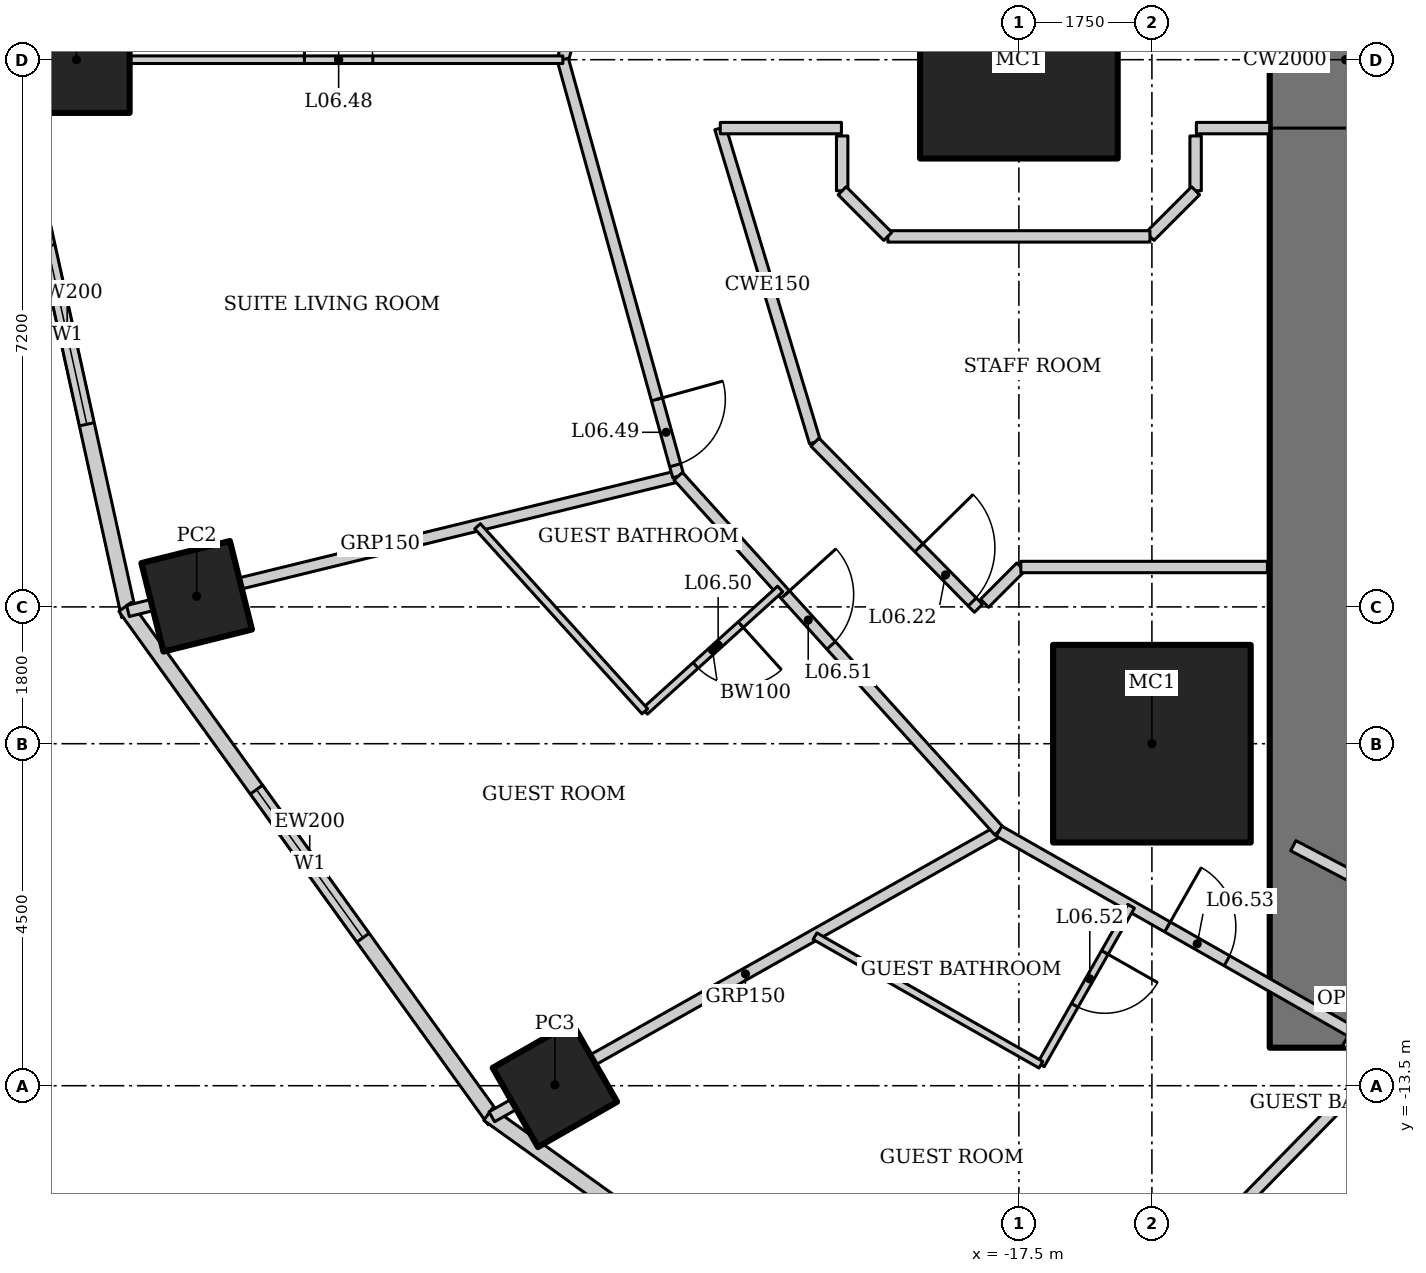
"""IFC4 building model, lengths in metres.
Left out: names, types, materials, properties, quantities, classifications, styles, units other than length and angle.
Written with IfcOpenShell. Run it as: python <this file> out.ifc"""

import sys

from ifc_helpers import new_model, si_unit, direction, frame, frame_2d, origin, origin_2d, place, context, subcontext, project, spatial, rectangle, hollow_rectangle, extrude, element, fill, save


model = new_model("IFC4")
c1 = context("Model", 3, precision=1e-05, world=origin(), true_north=direction((0.0, 1.0)))
c2 = subcontext(c1, "Body", "Model", "MODEL_VIEW")
j1 = project(units=[si_unit("LENGTHUNIT", "METRE"), si_unit("PLANEANGLEUNIT", "RADIAN")], contexts=[c1])
p1 = place(None, origin())
s1 = spatial("IfcSite", under=j1, at=p1, CompositionType="ELEMENT")
p2 = place(p1, origin())
s2 = spatial("IfcBuilding", under=s1, at=p2, CompositionType="ELEMENT")
p3 = place(p2, frame((0.0, 0.0, 37.0)))
s3 = spatial("IfcBuildingStorey", under=s2, at=p3, CompositionType="ELEMENT", Elevation=37.0)
for number, where, z_axis, x_axis in (
    (1, (-17.5, 0.0, 0.0), (0.0, 0.0, 1.0), (1.0, 0.0, 0.0)),
    (2, (-15.75, -9.0, 0.0), (0.0, 0.0, 1.0), (1.0, 0.0, 0.0)),
):
    element("IfcColumn", number, at=place(p3, frame(where, z_axis=z_axis, x_axis=x_axis)), inside=s3, PredefinedType="COLUMN", context=c2, shape_type="SweptSolid", body=[
        extrude(hollow_rectangle(XDim=2.6, YDim=2.6, WallThickness=0.13, at=origin_2d()), origin(), (0.0, 0.0, 1.0), 3.6),
    ])
p4 = place(p3, frame((-29.9, 0.0, 0.0), z_axis=(0.0, 0.0, 1.0), x_axis=(1.0, 0.0, 0.0)))
e3 = element("IfcColumn", 3, at=p4, inside=s3, PredefinedType="COLUMN", context=c2, shape_type="SweptSolid", body=[
    extrude(hollow_rectangle(XDim=1.4, YDim=1.4, WallThickness=0.1, at=origin_2d()), origin(), (0.0, 0.0, 1.0), 3.6),
])
p5 = place(p3, frame((-28.318, -7.06, 0.0), z_axis=(0.0, 0.0, 1.0), x_axis=(0.970295726276, 0.2419218956, 0.0)))
e4 = element("IfcColumn", 4, at=p5, inside=s3, PredefinedType="COLUMN", context=c2, shape_type="SweptSolid", body=[
    extrude(hollow_rectangle(XDim=1.2, YDim=1.2, WallThickness=0.1, at=origin_2d()), origin(), (0.0, 0.0, 1.0), 3.6),
])
p6 = place(p3, frame((-23.605, -13.489, 0.0), z_axis=(0.0, 0.0, 1.0), x_axis=(0.86824298017, 0.496139221777, 0.0)))
e5 = element("IfcColumn", 5, at=p6, inside=s3, PredefinedType="COLUMN", context=c2, shape_type="SweptSolid", body=[
    extrude(hollow_rectangle(XDim=1.2, YDim=1.2, WallThickness=0.12, at=origin_2d()), origin(), (0.0, 0.0, 1.0), 3.6),
])
p7 = place(p3, frame((-13.2, 13.0, 0.0), z_axis=(0.0, 0.0, 1.0), x_axis=(0.0, -1.0, 0.0)))
e6 = element("IfcWall", 6, at=p7, inside=s3, PredefinedType="SHEAR", context=c2, shape_type="SweptSolid", body=[
    extrude(rectangle(XDim=26.0, YDim=2.0, at=frame_2d((13.0, 0.0))), origin(), (0.0, 0.0, 1.0), 3.6),
])
p8 = place(p7, frame((12.1, 0.0, 0.0)))
e7 = element("IfcOpeningElement", 7, at=p8, cuts=e6, PredefinedType="OPENING", context=c2, shape_type="SweptSolid", body=[
    extrude(rectangle(XDim=1.8, YDim=2.1, at=frame_2d((0.9, 1.05))), frame((0.0, 1.01, 0.0), z_axis=(0.0, -1.0, 0.0), x_axis=(1.0, 0.0, 0.0)), (0.0, 0.0, 1.0), 2.02),
])
p9 = place(p3, frame((-29.208, 7.318, 0.0), z_axis=(0.0, 0.0, 1.0), x_axis=(-0.215238065514, -0.976561608478, 0.0)))
e8 = element("IfcWall", 8, at=p9, inside=s3, PredefinedType="SOLIDWALL", context=c2, shape_type="SweptSolid", body=[
    extrude(rectangle(XDim=7.562, YDim=0.2, at=frame_2d((3.781, 0.0))), origin(), (0.0, 0.0, 1.0), 3.45),
])
p10 = place(p9, frame((2.581, 0.0, 0.5)))
e9 = element("IfcOpeningElement", 9, at=p10, cuts=e8, PredefinedType="OPENING", context=c2, shape_type="SweptSolid", body=[
    extrude(rectangle(XDim=2.4, YDim=2.2, at=frame_2d((1.2, 1.1))), frame((0.0, 0.11, 0.0), z_axis=(0.0, -1.0, 0.0), x_axis=(1.0, 0.0, 0.0)), (0.0, 0.0, 1.0), 0.22),
])
p11 = place(p3, frame((-30.835, 0.067, 0.0), z_axis=(0.0, 0.0, 1.0), x_axis=(0.215238065514, -0.976561608478, 0.0)))
e10 = element("IfcWall", 10, at=p11, inside=s3, PredefinedType="SOLIDWALL", context=c2, shape_type="SweptSolid", body=[
    extrude(rectangle(XDim=7.562, YDim=0.2, at=frame_2d((3.781, 0.0))), origin(), (0.0, 0.0, 1.0), 3.45),
])
p12 = place(p11, frame((2.581, 0.0, 0.5)))
e11 = element("IfcOpeningElement", 11, at=p12, cuts=e10, PredefinedType="OPENING", context=c2, shape_type="SweptSolid", body=[
    extrude(rectangle(XDim=2.4, YDim=2.2, at=frame_2d((1.2, 1.1))), frame((0.0, 0.11, 0.0), z_axis=(0.0, -1.0, 0.0), x_axis=(1.0, 0.0, 0.0)), (0.0, 0.0, 1.0), 0.22),
])
p13 = place(p3, frame((-29.26, -7.2, 0.0), z_axis=(0.0, 0.0, 1.0), x_axis=(0.583937613703, -0.811798536155, 0.0)))
e12 = element("IfcWall", 12, at=p13, inside=s3, PredefinedType="SOLIDWALL", context=c2, shape_type="SweptSolid", body=[
    extrude(rectangle(XDim=8.323, YDim=0.2, at=frame_2d((4.162, 0.0))), origin(), (0.0, 0.0, 1.0), 3.45),
])
p14 = place(p13, frame((2.961, 0.0, 0.5)))
e13 = element("IfcOpeningElement", 13, at=p14, cuts=e12, PredefinedType="OPENING", context=c2, shape_type="SweptSolid", body=[
    extrude(rectangle(XDim=2.4, YDim=2.2, at=frame_2d((1.2, 1.1))), frame((0.0, 0.11, 0.0), z_axis=(0.0, -1.0, 0.0), x_axis=(1.0, 0.0, 0.0)), (0.0, 0.0, 1.0), 0.22),
])
p15 = place(p3, frame((-24.482, -13.875, 0.0), z_axis=(0.0, 0.0, 1.0), x_axis=(0.812791321576, -0.582554948112, 0.0)))
e14 = element("IfcWall", 14, at=p15, inside=s3, PredefinedType="SOLIDWALL", context=c2, shape_type="SweptSolid", body=[
    extrude(rectangle(XDim=8.063, YDim=0.2, at=frame_2d((4.032, 0.0))), origin(), (0.0, 0.0, 1.0), 3.45),
])
p16 = place(p15, frame((2.832, 0.0, 0.5)))
e15 = element("IfcOpeningElement", 15, at=p16, cuts=e14, PredefinedType="OPENING", context=c2, shape_type="SweptSolid", body=[
    extrude(rectangle(XDim=2.4, YDim=2.2, at=frame_2d((1.2, 1.1))), frame((0.0, 0.11, 0.0), z_axis=(0.0, -1.0, 0.0), x_axis=(1.0, 0.0, 0.0)), (0.0, 0.0, 1.0), 0.22),
])
p17 = place(p3, frame((-29.222, -7.254, 0.0), z_axis=(0.0, 0.0, 1.0), x_axis=(0.97130070913, 0.237854855832, 0.0)))
e16 = element("IfcWall", 16, at=p17, inside=s3, PredefinedType="PARTITIONING", context=c2, shape_type="SweptSolid", body=[
    extrude(rectangle(XDim=7.454, YDim=0.15, at=frame_2d((3.727, 0.0))), origin(), (0.0, 0.0, 1.0), 2.333),
])
p18 = place(p3, frame((-24.435, -13.909, 0.0), z_axis=(0.0, 0.0, 1.0), x_axis=(0.871267209855, 0.490808974074, 0.0)))
e17 = element("IfcWall", 17, at=p18, inside=s3, PredefinedType="PARTITIONING", context=c2, shape_type="SweptSolid", body=[
    extrude(rectangle(XDim=7.659, YDim=0.15, at=frame_2d((3.83, 0.0))), origin(), (0.0, 0.0, 1.0), 2.693),
])
p19 = place(p3, frame((-17.97, -18.542, 0.0), z_axis=(0.0, 0.0, 1.0), x_axis=(0.699032031211, 0.715090357467, 0.0)))
e18 = element("IfcWall", 18, at=p19, inside=s3, PredefinedType="PARTITIONING", context=c2, shape_type="SweptSolid", body=[
    extrude(rectangle(XDim=7.647, YDim=0.15, at=frame_2d((3.824, 0.0))), origin(), (0.0, 0.0, 1.0), 2.528),
])
p20 = place(p3, frame((-21.982, 5.481, 0.0), z_axis=(0.0, 0.0, 1.0), x_axis=(-0.266933062421, -0.963715072097, 0.0)))
e19 = element("IfcWall", 19, at=p20, inside=s3, PredefinedType="PARTITIONING", context=c2, shape_type="SweptSolid", body=[
    extrude(rectangle(XDim=5.687, YDim=0.15, at=frame_2d((2.844, 0.0))), origin(), (0.0, 0.0, 1.0), 3.45),
])
p21 = place(p3, frame((-23.5, 0.0, 0.0), z_axis=(0.0, 0.0, 1.0), x_axis=(0.266933062421, -0.963715072097, 0.0)))
e20 = element("IfcWall", 20, at=p21, inside=s3, PredefinedType="PARTITIONING", context=c2, shape_type="SweptSolid", body=[
    extrude(rectangle(XDim=5.687, YDim=0.15, at=frame_2d((2.844, 0.0))), origin(), (0.0, 0.0, 1.0), 3.45),
])
p22 = place(p21, frame((4.637, 0.0, 0.0)))
e21 = element("IfcOpeningElement", 21, at=p22, cuts=e20, PredefinedType="OPENING", context=c2, shape_type="SweptSolid", body=[
    extrude(rectangle(XDim=0.9, YDim=2.1, at=frame_2d((0.45, 1.05))), frame((0.0, 0.085, 0.0), z_axis=(0.0, -1.0, 0.0), x_axis=(1.0, 0.0, 0.0)), (0.0, 0.0, 1.0), 0.17),
])
p23 = place(p3, frame((-21.982, -5.481, 0.0), z_axis=(0.0, 0.0, 1.0), x_axis=(0.670598380282, -0.741820606591, 0.0)))
e22 = element("IfcWall", 22, at=p23, inside=s3, PredefinedType="PARTITIONING", context=c2, shape_type="SweptSolid", body=[
    extrude(rectangle(XDim=6.293, YDim=0.15, at=frame_2d((3.147, 0.0))), origin(), (0.0, 0.0, 1.0), 3.45),
])
p24 = place(p23, frame((2.1, 0.0, 0.0)))
e23 = element("IfcOpeningElement", 23, at=p24, cuts=e22, PredefinedType="OPENING", context=c2, shape_type="SweptSolid", body=[
    extrude(rectangle(XDim=0.9, YDim=2.1, at=frame_2d((0.45, 1.05))), frame((0.0, 0.085, 0.0), z_axis=(0.0, -1.0, 0.0), x_axis=(1.0, 0.0, 0.0)), (0.0, 0.0, 1.0), 0.17),
])
p25 = place(p3, frame((-17.761, -10.149, 0.0), z_axis=(0.0, 0.0, 1.0), x_axis=(0.86907565943, -0.494679187136, 0.0)))
e24 = element("IfcWall", 24, at=p25, inside=s3, PredefinedType="PARTITIONING", context=c2, shape_type="SweptSolid", body=[
    extrude(rectangle(XDim=5.911, YDim=0.15, at=frame_2d((2.955, 0.0))), origin(), (0.0, 0.0, 1.0), 3.45),
])
p26 = place(p25, frame((2.55, 0.0, 0.0)))
e25 = element("IfcOpeningElement", 25, at=p26, cuts=e24, PredefinedType="OPENING", context=c2, shape_type="SweptSolid", body=[
    extrude(rectangle(XDim=0.9, YDim=2.1, at=frame_2d((0.45, 1.05))), frame((0.0, 0.085, 0.0), z_axis=(0.0, -1.0, 0.0), x_axis=(1.0, 0.0, 0.0)), (0.0, 0.0, 1.0), 0.17),
])
p27 = place(p3, frame((-21.429, -0.9, 0.0), z_axis=(0.0, 0.0, 1.0), x_axis=(0.288603524054, -0.957448696225, 0.0)))
e26 = element("IfcWall", 26, at=p27, inside=s3, PredefinedType="PARTITIONING", context=c2, shape_type="SweptSolid", body=[
    extrude(rectangle(XDim=4.316, YDim=0.15, at=frame_2d((2.158, 0.0))), origin(), (0.0, 0.0, 1.0), 3.45),
])
p28 = place(p3, frame((-29.4, 0.0, 0.0), z_axis=(0.0, 0.0, 1.0), x_axis=(1.0, 0.0, 0.0)))
e27 = element("IfcWall", 27, at=p28, inside=s3, PredefinedType="PARTITIONING", context=c2, shape_type="SweptSolid", body=[
    extrude(rectangle(XDim=5.9, YDim=0.1, at=frame_2d((2.95, 0.0))), origin(), (0.0, 0.0, 1.0), 2.528),
])
p29 = place(p28, frame((2.5, 0.0, 0.0)))
e28 = element("IfcOpeningElement", 28, at=p29, cuts=e27, PredefinedType="OPENING", context=c2, shape_type="SweptSolid", body=[
    extrude(rectangle(XDim=0.9, YDim=2.1, at=frame_2d((0.45, 1.05))), frame((0.0, 0.06, 0.0), z_axis=(0.0, -1.0, 0.0), x_axis=(1.0, 0.0, 0.0)), (0.0, 0.0, 1.0), 0.12),
])
p30 = place(p3, frame((-20.641, -6.964, 0.0), z_axis=(0.0, 0.0, 1.0), x_axis=(-0.741861025859, -0.670553665496, 0.0)))
e29 = element("IfcWall", 29, at=p30, inside=s3, PredefinedType="PARTITIONING", context=c2, shape_type="SweptSolid", body=[
    extrude(rectangle(XDim=2.4, YDim=0.1, at=frame_2d((1.2, 0.0))), origin(), (0.0, 0.0, 1.0), 3.45),
])
p31 = place(p30, frame((0.7, 0.0, 0.0)))
e30 = element("IfcOpeningElement", 30, at=p31, cuts=e29, PredefinedType="OPENING", context=c2, shape_type="SweptSolid", body=[
    extrude(rectangle(XDim=0.8, YDim=2.1, at=frame_2d((0.4, 1.05))), frame((0.0, 0.06, 0.0), z_axis=(0.0, -1.0, 0.0), x_axis=(1.0, 0.0, 0.0)), (0.0, 0.0, 1.0), 0.12),
])
p32 = place(p3, frame((-22.421, -8.574, 0.0), z_axis=(0.0, 0.0, 1.0), x_axis=(-0.670578246017, 0.741838807268, 0.0)))
e31 = element("IfcWall", 31, at=p32, inside=s3, PredefinedType="PARTITIONING", context=c2, shape_type="SweptSolid", body=[
    extrude(rectangle(XDim=3.282, YDim=0.1, at=frame_2d((1.641, 0.0))), origin(), (0.0, 0.0, 1.0), 3.45),
])
p33 = place(p3, frame((-16.023, -11.139, 0.0), z_axis=(0.0, 0.0, 1.0), x_axis=(-0.494659381266, -0.869086932663, 0.0)))
e32 = element("IfcWall", 32, at=p33, inside=s3, PredefinedType="PARTITIONING", context=c2, shape_type="SweptSolid", body=[
    extrude(rectangle(XDim=2.4, YDim=0.1, at=frame_2d((1.2, 0.0))), origin(), (0.0, 0.0, 1.0), 3.45),
])
p34 = place(p33, frame((0.7, 0.0, 0.0)))
e33 = element("IfcOpeningElement", 33, at=p34, cuts=e32, PredefinedType="OPENING", context=c2, shape_type="SweptSolid", body=[
    extrude(rectangle(XDim=0.8, YDim=2.1, at=frame_2d((0.4, 1.05))), frame((0.0, 0.06, 0.0), z_axis=(0.0, -1.0, 0.0), x_axis=(1.0, 0.0, 0.0)), (0.0, 0.0, 1.0), 0.12),
])
p35 = place(p3, frame((-17.21, -13.225, 0.0), z_axis=(0.0, 0.0, 1.0), x_axis=(-0.869041592831, 0.494739032147, 0.0)))
e34 = element("IfcWall", 34, at=p35, inside=s3, PredefinedType="PARTITIONING", context=c2, shape_type="SweptSolid", body=[
    extrude(rectangle(XDim=3.42, YDim=0.1, at=frame_2d((1.71, 0.0))), origin(), (0.0, 0.0, 1.0), 3.45),
])
p36 = place(p3, frame((-13.2, -13.0, 0.0), z_axis=(0.0, 0.0, 1.0), x_axis=(0.49435138335, 0.869262164011, 0.0)))
e35 = element("IfcWall", 35, at=p36, inside=s3, PredefinedType="PARTITIONING", context=c2, shape_type="SweptSolid", body=[
    extrude(rectangle(XDim=0.221, YDim=0.1, at=frame_2d((0.11, 0.0))), origin(), (0.0, 0.0, 1.0), 3.45),
])
p37 = place(p3, frame((-14.2, -0.9, 0.0), z_axis=(0.0, 0.0, 1.0), x_axis=(-1.0, 0.0, 0.0)))
e36 = element("IfcWall", 36, at=p37, inside=s3, PredefinedType="PARTITIONING", context=c2, shape_type="SweptSolid", body=[
    extrude(rectangle(XDim=0.965, YDim=0.15, at=frame_2d((0.482, 0.0))), origin(), (0.0, 0.0, 1.0), 3.45),
])
p38 = place(p3, frame((-19.835, -0.9, 0.0), z_axis=(0.0, 0.0, 1.0), x_axis=(-1.0, 0.0, 0.0)))
e37 = element("IfcWall", 37, at=p38, inside=s3, PredefinedType="PARTITIONING", context=c2, shape_type="SweptSolid", body=[
    extrude(rectangle(XDim=1.594, YDim=0.15, at=frame_2d((0.797, 0.0))), origin(), (0.0, 0.0, 1.0), 3.45),
])
for number, where, z_axis, x_axis in (
    (38, (-19.825, -1.725, 0.0), (0.0, 0.0, 1.0), (0.0, 1.0, 0.0)),
    (39, (-15.175, -1.003, 0.0), (0.0, 0.0, 1.0), (0.0, -1.0, 0.0)),
):
    element("IfcWall", number, at=place(p3, frame(where, z_axis=z_axis, x_axis=x_axis)), inside=s3, PredefinedType="PARTITIONING", context=c2, shape_type="SweptSolid", body=[
        extrude(rectangle(XDim=0.721, YDim=0.15, at=frame_2d((0.361, 0.0))), origin(), (0.0, 0.0, 1.0), 3.45),
    ])
p39 = place(p3, frame((-15.175, -1.725, 0.0), z_axis=(0.0, 0.0, 1.0), x_axis=(-0.707106781187, -0.707106781187, 0.0)))
e40 = element("IfcWall", 40, at=p39, inside=s3, PredefinedType="PARTITIONING", context=c2, shape_type="SweptSolid", body=[
    extrude(rectangle(XDim=0.849, YDim=0.15, at=frame_2d((0.425, 0.0))), origin(), (0.0, 0.0, 1.0), 3.45),
])
p40 = place(p3, frame((-15.775, -2.325, 0.0), z_axis=(0.0, 0.0, 1.0), x_axis=(-1.0, 0.0, 0.0)))
e41 = element("IfcWall", 41, at=p40, inside=s3, PredefinedType="PARTITIONING", context=c2, shape_type="SweptSolid", body=[
    extrude(rectangle(XDim=3.449, YDim=0.15, at=frame_2d((1.725, 0.0))), origin(), (0.0, 0.0, 1.0), 3.45),
])
p41 = place(p3, frame((-19.225, -2.325, 0.0), z_axis=(0.0, 0.0, 1.0), x_axis=(-0.707106781187, 0.707106781187, 0.0)))
e42 = element("IfcWall", 42, at=p41, inside=s3, PredefinedType="PARTITIONING", context=c2, shape_type="SweptSolid", body=[
    extrude(rectangle(XDim=0.849, YDim=0.15, at=frame_2d((0.425, 0.0))), origin(), (0.0, 0.0, 1.0), 3.45),
])
p42 = place(p3, frame((-20.183, -5.032, 0.0), z_axis=(0.0, 0.0, 1.0), x_axis=(0.701392176983, -0.712775570616, 0.0)))
e43 = element("IfcWall", 43, at=p42, inside=s3, PredefinedType="PARTITIONING", context=c2, shape_type="SweptSolid", body=[
    extrude(rectangle(XDim=3.067, YDim=0.15, at=frame_2d((1.533, 0.0))), origin(), (0.0, 0.0, 1.0), 3.45),
])
p43 = place(p42, frame((1.95, 0.0, 0.0)))
e44 = element("IfcOpeningElement", 44, at=p43, cuts=e43, PredefinedType="OPENING", context=c2, shape_type="SweptSolid", body=[
    extrude(rectangle(XDim=1.0, YDim=2.1, at=frame_2d((0.5, 1.05))), frame((0.0, 0.085, 0.0), z_axis=(0.0, -1.0, 0.0), x_axis=(1.0, 0.0, 0.0)), (0.0, 0.0, 1.0), 0.17),
])
p44 = place(p3, frame((-13.89, -10.342, 0.0), z_axis=(0.0, 0.0, 1.0), x_axis=(0.886275255135, -0.463158905922, 0.0)))
e45 = element("IfcWall", 45, at=p44, inside=s3, PredefinedType="PARTITIONING", context=c2, shape_type="SweptSolid", body=[
    extrude(rectangle(XDim=2.927, YDim=0.15, at=frame_2d((1.463, 0.0))), origin(), (0.0, 0.0, 1.0), 3.45),
])
p45 = place(p3, frame((-17.952, -7.152, 0.0), z_axis=(0.0, 0.0, 1.0), x_axis=(0.707106781187, 0.707106781187, 0.0)))
e46 = element("IfcWall", 46, at=p45, inside=s3, PredefinedType="PARTITIONING", context=c2, shape_type="SweptSolid", body=[
    extrude(rectangle(XDim=0.675, YDim=0.15, at=frame_2d((0.337, 0.0))), origin(), (0.0, 0.0, 1.0), 3.45),
])
p46 = place(p3, frame((-17.475, -6.675, 0.0), z_axis=(0.0, 0.0, 1.0), x_axis=(1.0, 0.0, 0.0)))
e47 = element("IfcWall", 47, at=p46, inside=s3, PredefinedType="PARTITIONING", context=c2, shape_type="SweptSolid", body=[
    extrude(rectangle(XDim=3.245, YDim=0.15, at=frame_2d((1.622, 0.0))), origin(), (0.0, 0.0, 1.0), 3.45),
])
p47 = place(p12, origin())
e48 = element("IfcWindow", 48, at=p47, inside=s3, PartitioningType="SINGLE_PANEL", PredefinedType="WINDOW", context=c2, shape_type="SweptSolid", body=[
    extrude(rectangle(XDim=2.4, YDim=2.2, at=frame_2d((1.2, 1.1))), frame((0.0, 0.03, 0.0), z_axis=(0.0, -1.0, 0.0), x_axis=(1.0, 0.0, 0.0)), (0.0, 0.0, 1.0), 0.06),
])
fill(e11, e48)
p48 = place(p14, origin())
e49 = element("IfcWindow", 49, at=p48, inside=s3, PartitioningType="SINGLE_PANEL", PredefinedType="WINDOW", context=c2, shape_type="SweptSolid", body=[
    extrude(rectangle(XDim=2.4, YDim=2.2, at=frame_2d((1.2, 1.1))), frame((0.0, 0.03, 0.0), z_axis=(0.0, -1.0, 0.0), x_axis=(1.0, 0.0, 0.0)), (0.0, 0.0, 1.0), 0.06),
])
fill(e13, e49)
p49 = place(p8, origin())
e50 = element("IfcDoor", 50, at=p49, inside=s3, OperationType="DOUBLE_DOOR_DOUBLE_SWING", PredefinedType="DOOR", context=c2, shape_type="SweptSolid", body=[
    extrude(rectangle(XDim=1.8, YDim=2.1, at=frame_2d((0.9, 1.05))), frame((0.0, 0.025, 0.0), z_axis=(0.0, -1.0, 0.0), x_axis=(1.0, 0.0, 0.0)), (0.0, 0.0, 1.0), 0.05),
])
fill(e7, e50)
p50 = place(p43, origin())
e51 = element("IfcDoor", 51, at=p50, inside=s3, OperationType="SINGLE_SWING_LEFT", PredefinedType="DOOR", context=c2, shape_type="SweptSolid", body=[
    extrude(rectangle(XDim=1.0, YDim=2.1, at=frame_2d((0.5, 1.05))), frame((0.0, 0.025, 0.0), z_axis=(0.0, -1.0, 0.0), x_axis=(1.0, 0.0, 0.0)), (0.0, 0.0, 1.0), 0.05),
])
fill(e44, e51)
p51 = place(p29, origin())
e52 = element("IfcDoor", 52, at=p51, inside=s3, OperationType="SINGLE_SWING_LEFT", PredefinedType="DOOR", context=c2, shape_type="SweptSolid", body=[
    extrude(rectangle(XDim=0.9, YDim=2.1, at=frame_2d((0.45, 1.05))), frame((0.0, 0.025, 0.0), z_axis=(0.0, -1.0, 0.0), x_axis=(1.0, 0.0, 0.0)), (0.0, 0.0, 1.0), 0.05),
])
fill(e28, e52)
p52 = place(p22, origin())
e53 = element("IfcDoor", 53, at=p52, inside=s3, OperationType="SINGLE_SWING_LEFT", PredefinedType="DOOR", context=c2, shape_type="SweptSolid", body=[
    extrude(rectangle(XDim=0.9, YDim=2.1, at=frame_2d((0.45, 1.05))), frame((0.0, 0.025, 0.0), z_axis=(0.0, -1.0, 0.0), x_axis=(1.0, 0.0, 0.0)), (0.0, 0.0, 1.0), 0.05),
])
fill(e21, e53)
p53 = place(p31, origin())
e54 = element("IfcDoor", 54, at=p53, inside=s3, OperationType="SINGLE_SWING_LEFT", PredefinedType="DOOR", context=c2, shape_type="SweptSolid", body=[
    extrude(rectangle(XDim=0.8, YDim=2.1, at=frame_2d((0.4, 1.05))), frame((0.0, 0.025, 0.0), z_axis=(0.0, -1.0, 0.0), x_axis=(1.0, 0.0, 0.0)), (0.0, 0.0, 1.0), 0.05),
])
fill(e30, e54)
p54 = place(p24, origin())
e55 = element("IfcDoor", 55, at=p54, inside=s3, OperationType="SINGLE_SWING_LEFT", PredefinedType="DOOR", context=c2, shape_type="SweptSolid", body=[
    extrude(rectangle(XDim=0.9, YDim=2.1, at=frame_2d((0.45, 1.05))), frame((0.0, 0.025, 0.0), z_axis=(0.0, -1.0, 0.0), x_axis=(1.0, 0.0, 0.0)), (0.0, 0.0, 1.0), 0.05),
])
fill(e23, e55)
p55 = place(p34, origin())
e56 = element("IfcDoor", 56, at=p55, inside=s3, OperationType="SINGLE_SWING_LEFT", PredefinedType="DOOR", context=c2, shape_type="SweptSolid", body=[
    extrude(rectangle(XDim=0.8, YDim=2.1, at=frame_2d((0.4, 1.05))), frame((0.0, 0.025, 0.0), z_axis=(0.0, -1.0, 0.0), x_axis=(1.0, 0.0, 0.0)), (0.0, 0.0, 1.0), 0.05),
])
fill(e33, e56)
p56 = place(p26, origin())
e57 = element("IfcDoor", 57, at=p56, inside=s3, OperationType="SINGLE_SWING_LEFT", PredefinedType="DOOR", context=c2, shape_type="SweptSolid", body=[
    extrude(rectangle(XDim=0.9, YDim=2.1, at=frame_2d((0.45, 1.05))), frame((0.0, 0.025, 0.0), z_axis=(0.0, -1.0, 0.0), x_axis=(1.0, 0.0, 0.0)), (0.0, 0.0, 1.0), 0.05),
])
fill(e25, e57)
save(model, sys.argv[1])
